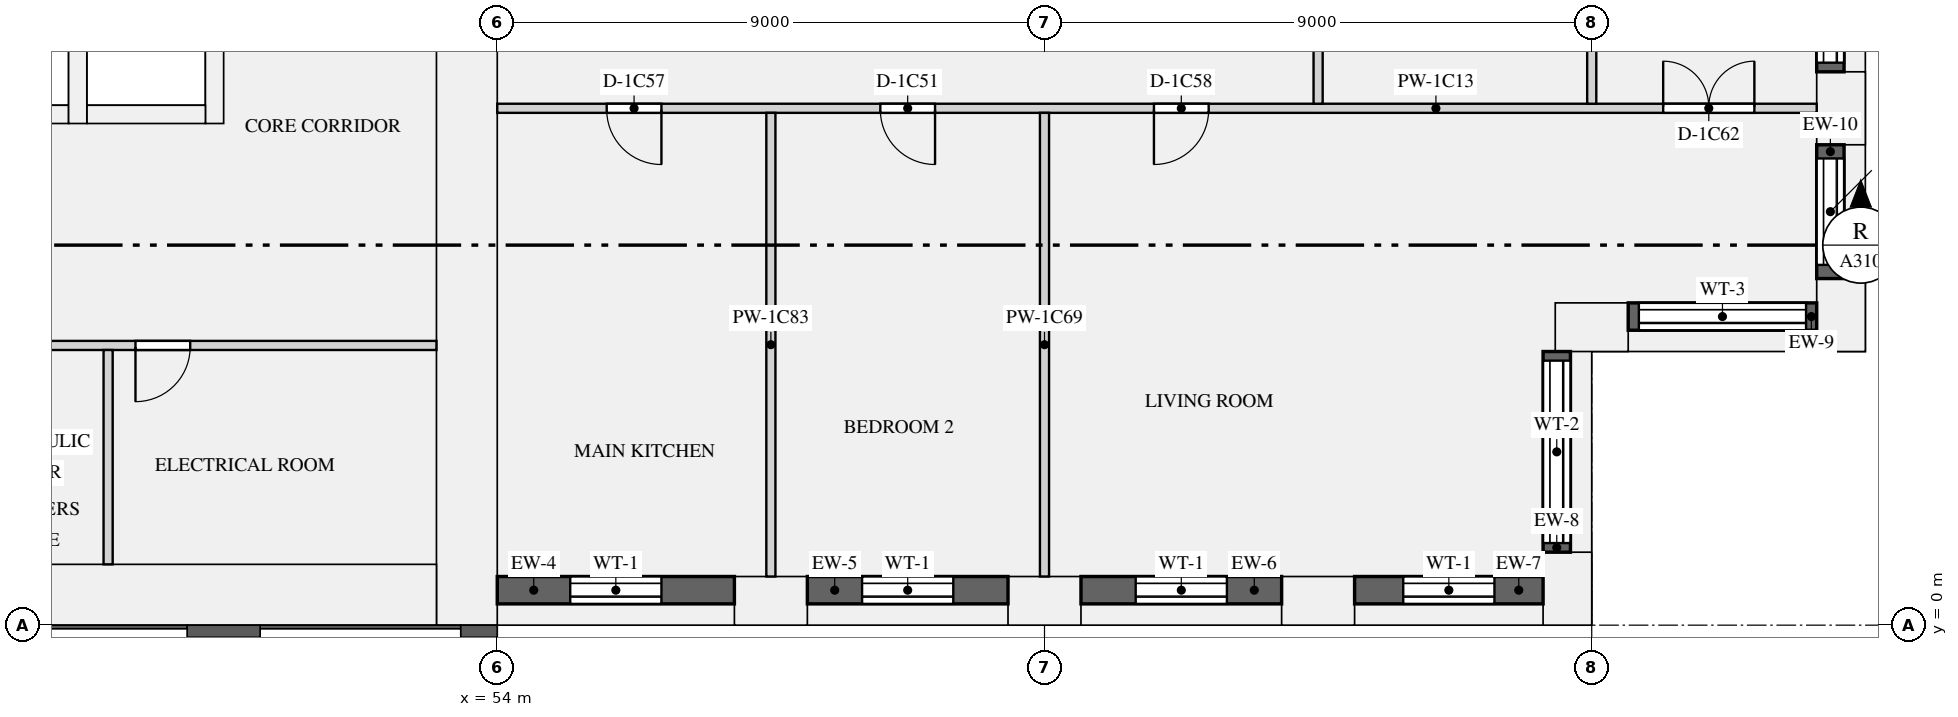
"""IFC4 building model, lengths in metres.
Left out: names, types, materials, properties, quantities, classifications, styles, units other than length and angle.
Written with IfcOpenShell. Run it as: python <this file> out.ifc"""

import sys

from ifc_helpers import new_model, si_unit, direction, frame, frame_2d, origin, origin_2d, place, context, subcontext, project, spatial, rectangle, extrude, element, fill, save


model = new_model("IFC4")
c1 = context("Model", 3, precision=1e-05, world=origin(), true_north=direction((0.0, 1.0)))
c2 = subcontext(c1, "Body", "Model", "MODEL_VIEW")
j1 = project(units=[si_unit("LENGTHUNIT", "METRE"), si_unit("PLANEANGLEUNIT", "RADIAN")], contexts=[c1])
p1 = place(None, origin())
s1 = spatial("IfcSite", under=j1, at=p1, CompositionType="ELEMENT")
p2 = place(p1, origin())
s2 = spatial("IfcBuilding", under=s1, at=p2, CompositionType="ELEMENT")
p3 = place(p2, frame((0.0, 0.0, 38.4)))
s3 = spatial("IfcBuildingStorey", under=s2, at=p3, CompositionType="ELEMENT", Elevation=38.4)
for number, where, z_axis, x_axis in (
    (1, (58.5, 0.4, 0.0), (0.0, 0.0, 1.0), (1.0, 0.0, 0.0)),
    (2, (63.0, 0.4, 0.0), (0.0, 0.0, 1.0), (1.0, 0.0, 0.0)),
    (3, (67.5, 0.4, 0.0), (0.0, 0.0, 1.0), (1.0, 0.0, 0.0)),
    (4, (71.6, 0.6, 0.0), (0.0, 0.0, 1.0), (0.0, 1.0, 0.0)),
    (5, (72.0, 4.9, 0.0), (0.0, 0.0, 1.0), (1.0, 0.0, 0.0)),
    (6, (76.1, 5.1, 0.0), (0.0, 0.0, 1.0), (0.0, 1.0, 0.0)),
    (7, (76.1, 8.5, 0.0), (0.0, 0.0, 1.0), (0.0, 1.0, 0.0)),
):
    element("IfcColumn", number, at=place(p3, frame(where, z_axis=z_axis, x_axis=x_axis)), inside=s3, PredefinedType="USERDEFINED", context=c2, shape_type="SweptSolid", body=[
        extrude(rectangle(XDim=1.2, YDim=0.8, at=origin_2d()), origin(), (0.0, 0.0, 1.0), 3.15),
    ])
p4 = place(p3, frame((53.5, 0.0, 0.0), z_axis=(0.0, 0.0, 1.0), x_axis=(0.0, 1.0, 0.0)))
e8 = element("IfcWall", 8, at=p4, inside=s3, PredefinedType="SHEAR", context=c2, shape_type="SweptSolid", body=[
    extrude(rectangle(XDim=12.5, YDim=1.0, at=frame_2d((6.25, 0.0))), origin(), (0.0, 0.0, 1.0), 3.15),
])
p5 = place(p3, frame((19.0, 0.5, 0.0), z_axis=(0.0, 0.0, 1.0), x_axis=(1.0, 0.0, 0.0)))
e9 = element("IfcWall", 9, at=p5, inside=s3, PredefinedType="SHEAR", context=c2, shape_type="SweptSolid", body=[
    extrude(rectangle(XDim=34.0, YDim=1.0, at=frame_2d((17.0, 0.0))), origin(), (0.0, 0.0, 1.0), 3.15),
])
for number, where, z_axis, x_axis in (
    (10, (45.0, 8.4, 0.0), (0.0, 0.0, 1.0), (1.0, 0.0, 0.0)),
    (11, (47.25, 8.4, 0.0), (0.0, 0.0, 1.0), (1.0, 0.0, 0.0)),
):
    element("IfcWall", number, at=place(p3, frame(where, z_axis=z_axis, x_axis=x_axis)), inside=s3, PredefinedType="SHEAR", context=c2, shape_type="SweptSolid", body=[
        extrude(rectangle(XDim=1.95, YDim=0.3, at=frame_2d((0.975, 0.0))), origin(), (0.0, 0.0, 1.0), 3.15),
    ])
for number, where, z_axis, x_axis in (
    (12, (47.1, 8.25, 0.0), (0.0, 0.0, 1.0), (0.0, 1.0, 0.0)),
    (13, (49.35, 8.25, 0.0), (0.0, 0.0, 1.0), (0.0, 1.0, 0.0)),
):
    element("IfcWall", number, at=place(p3, frame(where, z_axis=z_axis, x_axis=x_axis)), inside=s3, PredefinedType="SHEAR", context=c2, shape_type="SweptSolid", body=[
        extrude(rectangle(XDim=3.65, YDim=0.3, at=frame_2d((1.825, 0.0))), origin(), (0.0, 0.0, 1.0), 3.15),
    ])
p6 = place(p3, frame((54.0, 0.575, 0.9), z_axis=(0.0, 0.0, 1.0), x_axis=(1.0, 0.0, 0.0)))
e14 = element("IfcWall", 14, at=p6, inside=s3, PredefinedType="SOLIDWALL", context=c2, shape_type="SweptSolid", body=[
    extrude(rectangle(XDim=3.9, YDim=0.45, at=frame_2d((1.95, 0.0))), origin(), (0.0, 0.0, 1.0), 1.93),
])
p7 = place(p6, frame((1.2, 0.0, 0.15)))
e15 = element("IfcOpeningElement", 15, at=p7, cuts=e14, PredefinedType="OPENING", context=c2, shape_type="SweptSolid", body=[
    extrude(rectangle(XDim=1.5, YDim=1.5, at=frame_2d((0.75, 0.75))), frame((0.0, 0.235, 0.0), z_axis=(0.0, -1.0, 0.0), x_axis=(1.0, 0.0, 0.0)), (0.0, 0.0, 1.0), 0.47),
])
p8 = place(p3, frame((59.1, 0.575, 0.9), z_axis=(0.0, 0.0, 1.0), x_axis=(1.0, 0.0, 0.0)))
e16 = element("IfcWall", 16, at=p8, inside=s3, PredefinedType="SOLIDWALL", context=c2, shape_type="SweptSolid", body=[
    extrude(rectangle(XDim=3.3, YDim=0.45, at=frame_2d((1.65, 0.0))), origin(), (0.0, 0.0, 1.0), 1.93),
])
p9 = place(p8, frame((0.9, 0.0, 0.15)))
e17 = element("IfcOpeningElement", 17, at=p9, cuts=e16, PredefinedType="OPENING", context=c2, shape_type="SweptSolid", body=[
    extrude(rectangle(XDim=1.5, YDim=1.5, at=frame_2d((0.75, 0.75))), frame((0.0, 0.235, 0.0), z_axis=(0.0, -1.0, 0.0), x_axis=(1.0, 0.0, 0.0)), (0.0, 0.0, 1.0), 0.47),
])
p10 = place(p3, frame((63.6, 0.575, 0.9), z_axis=(0.0, 0.0, 1.0), x_axis=(1.0, 0.0, 0.0)))
e18 = element("IfcWall", 18, at=p10, inside=s3, PredefinedType="SOLIDWALL", context=c2, shape_type="SweptSolid", body=[
    extrude(rectangle(XDim=3.3, YDim=0.45, at=frame_2d((1.65, 0.0))), origin(), (0.0, 0.0, 1.0), 1.93),
])
p11 = place(p10, frame((0.9, 0.0, 0.15)))
e19 = element("IfcOpeningElement", 19, at=p11, cuts=e18, PredefinedType="OPENING", context=c2, shape_type="SweptSolid", body=[
    extrude(rectangle(XDim=1.5, YDim=1.5, at=frame_2d((0.75, 0.75))), frame((0.0, 0.235, 0.0), z_axis=(0.0, -1.0, 0.0), x_axis=(1.0, 0.0, 0.0)), (0.0, 0.0, 1.0), 0.47),
])
p12 = place(p3, frame((68.1, 0.575, 0.9), z_axis=(0.0, 0.0, 1.0), x_axis=(1.0, 0.0, 0.0)))
e20 = element("IfcWall", 20, at=p12, inside=s3, PredefinedType="SOLIDWALL", context=c2, shape_type="SweptSolid", body=[
    extrude(rectangle(XDim=3.1, YDim=0.45, at=frame_2d((1.55, 0.0))), origin(), (0.0, 0.0, 1.0), 1.93),
])
p13 = place(p12, frame((0.8, 0.0, 0.15)))
e21 = element("IfcOpeningElement", 21, at=p13, cuts=e20, PredefinedType="OPENING", context=c2, shape_type="SweptSolid", body=[
    extrude(rectangle(XDim=1.5, YDim=1.5, at=frame_2d((0.75, 0.75))), frame((0.0, 0.235, 0.0), z_axis=(0.0, -1.0, 0.0), x_axis=(1.0, 0.0, 0.0)), (0.0, 0.0, 1.0), 0.47),
])
p14 = place(p3, frame((71.425, 1.2, 0.9), z_axis=(0.0, 0.0, 1.0), x_axis=(0.0, 1.0, 0.0)))
e22 = element("IfcWall", 22, at=p14, inside=s3, PredefinedType="SOLIDWALL", context=c2, shape_type="SweptSolid", body=[
    extrude(rectangle(XDim=3.3, YDim=0.45, at=frame_2d((1.65, 0.0))), origin(), (0.0, 0.0, 1.0), 1.93),
])
p15 = place(p14, frame((0.15, 0.0, 0.15)))
e23 = element("IfcOpeningElement", 23, at=p15, cuts=e22, PredefinedType="OPENING", context=c2, shape_type="SweptSolid", body=[
    extrude(rectangle(XDim=3.0, YDim=1.5, at=frame_2d((1.5, 0.75))), frame((0.0, 0.235, 0.0), z_axis=(0.0, -1.0, 0.0), x_axis=(1.0, 0.0, 0.0)), (0.0, 0.0, 1.0), 0.47),
])
p16 = place(p3, frame((72.6, 5.075, 0.9), z_axis=(0.0, 0.0, 1.0), x_axis=(1.0, 0.0, 0.0)))
e24 = element("IfcWall", 24, at=p16, inside=s3, PredefinedType="SOLIDWALL", context=c2, shape_type="SweptSolid", body=[
    extrude(rectangle(XDim=3.1, YDim=0.45, at=frame_2d((1.55, 0.0))), origin(), (0.0, 0.0, 1.0), 1.93),
])
p17 = place(p16, frame((0.175, 0.0, 0.15)))
e25 = element("IfcOpeningElement", 25, at=p17, cuts=e24, PredefinedType="OPENING", context=c2, shape_type="SweptSolid", body=[
    extrude(rectangle(XDim=2.75, YDim=1.5, at=frame_2d((1.375, 0.75))), frame((0.0, 0.235, 0.0), z_axis=(0.0, -1.0, 0.0), x_axis=(1.0, 0.0, 0.0)), (0.0, 0.0, 1.0), 0.47),
])
p18 = place(p3, frame((75.925, 5.7, 0.9), z_axis=(0.0, 0.0, 1.0), x_axis=(0.0, 1.0, 0.0)))
e26 = element("IfcWall", 26, at=p18, inside=s3, PredefinedType="SOLIDWALL", context=c2, shape_type="SweptSolid", body=[
    extrude(rectangle(XDim=2.2, YDim=0.45, at=frame_2d((1.1, 0.0))), origin(), (0.0, 0.0, 1.0), 1.93),
])
p19 = place(p18, frame((0.225, 0.0, 0.15)))
e27 = element("IfcOpeningElement", 27, at=p19, cuts=e26, PredefinedType="OPENING", context=c2, shape_type="SweptSolid", body=[
    extrude(rectangle(XDim=1.75, YDim=1.5, at=frame_2d((0.875, 0.75))), frame((0.0, 0.235, 0.0), z_axis=(0.0, -1.0, 0.0), x_axis=(1.0, 0.0, 0.0)), (0.0, 0.0, 1.0), 0.47),
])
p20 = place(p3, frame((75.925, 9.1, 0.9), z_axis=(0.0, 0.0, 1.0), x_axis=(0.0, 1.0, 0.0)))
e28 = element("IfcWall", 28, at=p20, inside=s3, PredefinedType="SOLIDWALL", context=c2, shape_type="SweptSolid", body=[
    extrude(rectangle(XDim=2.8, YDim=0.45, at=frame_2d((1.4, 0.0))), origin(), (0.0, 0.0, 1.0), 1.93),
])
p21 = place(p20, frame((0.15, 0.0, 0.15)))
e29 = element("IfcOpeningElement", 29, at=p21, cuts=e28, PredefinedType="OPENING", context=c2, shape_type="SweptSolid", body=[
    extrude(rectangle(XDim=2.5, YDim=1.5, at=frame_2d((1.25, 0.75))), frame((0.0, 0.235, 0.0), z_axis=(0.0, -1.0, 0.0), x_axis=(1.0, 0.0, 0.0)), (0.0, 0.0, 1.0), 0.47),
])
p22 = place(p3, frame((44.7, 4.6, 0.0), z_axis=(0.0, 0.0, 1.0), x_axis=(1.0, 0.0, 0.0)))
e30 = element("IfcWall", 30, at=p22, inside=s3, PredefinedType="PARTITIONING", context=c2, shape_type="SweptSolid", body=[
    extrude(rectangle(XDim=8.3, YDim=0.15, at=frame_2d((4.15, 0.0))), origin(), (0.0, 0.0, 1.0), 2.83),
])
p23 = place(p22, frame((0.35, 0.0, 0.0)))
e31 = element("IfcOpeningElement", 31, at=p23, cuts=e30, PredefinedType="OPENING", context=c2, shape_type="SweptSolid", body=[
    extrude(rectangle(XDim=0.9, YDim=2.1, at=frame_2d((0.45, 1.05))), frame((0.0, 0.085, 0.0), z_axis=(0.0, -1.0, 0.0), x_axis=(1.0, 0.0, 0.0)), (0.0, 0.0, 1.0), 0.17),
])
p24 = place(p22, frame((3.35, 0.0, 0.0)))
e32 = element("IfcOpeningElement", 32, at=p24, cuts=e30, PredefinedType="OPENING", context=c2, shape_type="SweptSolid", body=[
    extrude(rectangle(XDim=0.9, YDim=2.1, at=frame_2d((0.45, 1.05))), frame((0.0, 0.085, 0.0), z_axis=(0.0, -1.0, 0.0), x_axis=(1.0, 0.0, 0.0)), (0.0, 0.0, 1.0), 0.17),
])
p25 = place(p3, frame((47.6, 1.0, 0.0), z_axis=(0.0, 0.0, 1.0), x_axis=(0.0, 1.0, 0.0)))
e33 = element("IfcWall", 33, at=p25, inside=s3, PredefinedType="PARTITIONING", context=c2, shape_type="SweptSolid", body=[
    extrude(rectangle(XDim=3.525, YDim=0.15, at=frame_2d((1.762, 0.0))), origin(), (0.0, 0.0, 1.0), 2.83),
])
p26 = place(p3, frame((54.0, 8.5, 0.0), z_axis=(0.0, 0.0, 1.0), x_axis=(1.0, 0.0, 0.0)))
e34 = element("IfcWall", 34, at=p26, inside=s3, PredefinedType="PARTITIONING", context=c2, shape_type="SweptSolid", body=[
    extrude(rectangle(XDim=21.7, YDim=0.15, at=frame_2d((10.85, 0.0))), origin(), (0.0, 0.0, 1.0), 2.83),
])
p27 = place(p26, frame((6.3, 0.0, 0.0)))
e35 = element("IfcOpeningElement", 35, at=p27, cuts=e34, PredefinedType="OPENING", context=c2, shape_type="SweptSolid", body=[
    extrude(rectangle(XDim=0.9, YDim=2.1, at=frame_2d((0.45, 1.05))), frame((0.0, 0.085, 0.0), z_axis=(0.0, -1.0, 0.0), x_axis=(1.0, 0.0, 0.0)), (0.0, 0.0, 1.0), 0.17),
])
p28 = place(p26, frame((1.8, 0.0, 0.0)))
e36 = element("IfcOpeningElement", 36, at=p28, cuts=e34, PredefinedType="OPENING", context=c2, shape_type="SweptSolid", body=[
    extrude(rectangle(XDim=0.9, YDim=2.1, at=frame_2d((0.45, 1.05))), frame((0.0, 0.085, 0.0), z_axis=(0.0, -1.0, 0.0), x_axis=(1.0, 0.0, 0.0)), (0.0, 0.0, 1.0), 0.17),
])
p29 = place(p26, frame((10.8, 0.0, 0.0)))
e37 = element("IfcOpeningElement", 37, at=p29, cuts=e34, PredefinedType="OPENING", context=c2, shape_type="SweptSolid", body=[
    extrude(rectangle(XDim=0.9, YDim=2.1, at=frame_2d((0.45, 1.05))), frame((0.0, 0.085, 0.0), z_axis=(0.0, -1.0, 0.0), x_axis=(1.0, 0.0, 0.0)), (0.0, 0.0, 1.0), 0.17),
])
p30 = place(p26, frame((19.175, 0.0, 0.0)))
e38 = element("IfcOpeningElement", 38, at=p30, cuts=e34, PredefinedType="OPENING", context=c2, shape_type="SweptSolid", body=[
    extrude(rectangle(XDim=1.5, YDim=2.1, at=frame_2d((0.75, 1.05))), frame((0.0, 0.085, 0.0), z_axis=(0.0, -1.0, 0.0), x_axis=(1.0, 0.0, 0.0)), (0.0, 0.0, 1.0), 0.17),
])
p31 = place(p3, frame((63.0, 0.8, 0.0), z_axis=(0.0, 0.0, 1.0), x_axis=(0.0, 1.0, 0.0)))
e39 = element("IfcWall", 39, at=p31, inside=s3, PredefinedType="PARTITIONING", context=c2, shape_type="SweptSolid", body=[
    extrude(rectangle(XDim=7.625, YDim=0.15, at=frame_2d((3.812, 0.0))), origin(), (0.0, 0.0, 1.0), 2.83),
])
p32 = place(p3, frame((72.0, 8.575, 0.0), z_axis=(0.0, 0.0, 1.0), x_axis=(0.0, 1.0, 0.0)))
e40 = element("IfcWall", 40, at=p32, inside=s3, PredefinedType="PARTITIONING", context=c2, shape_type="SweptSolid", body=[
    extrude(rectangle(XDim=3.85, YDim=0.15, at=frame_2d((1.925, 0.0))), origin(), (0.0, 0.0, 1.0), 2.83),
])
p33 = place(p3, frame((67.5, 8.575, 0.0), z_axis=(0.0, 0.0, 1.0), x_axis=(0.0, 1.0, 0.0)))
e41 = element("IfcWall", 41, at=p33, inside=s3, PredefinedType="PARTITIONING", context=c2, shape_type="SweptSolid", body=[
    extrude(rectangle(XDim=15.35, YDim=0.15, at=frame_2d((7.675, 0.0))), origin(), (0.0, 0.0, 1.0), 2.83),
])
p34 = place(p33, frame((7.475, 0.0, 0.0)))
e42 = element("IfcOpeningElement", 42, at=p34, cuts=e41, PredefinedType="OPENING", context=c2, shape_type="SweptSolid", body=[
    extrude(rectangle(XDim=0.9, YDim=2.1, at=frame_2d((0.45, 1.05))), frame((0.0, 0.085, 0.0), z_axis=(0.0, -1.0, 0.0), x_axis=(1.0, 0.0, 0.0)), (0.0, 0.0, 1.0), 0.17),
])
p35 = place(p33, frame((1.475, 0.0, 0.0)))
e43 = element("IfcOpeningElement", 43, at=p35, cuts=e41, PredefinedType="OPENING", context=c2, shape_type="SweptSolid", body=[
    extrude(rectangle(XDim=0.9, YDim=2.1, at=frame_2d((0.45, 1.05))), frame((0.0, 0.085, 0.0), z_axis=(0.0, -1.0, 0.0), x_axis=(1.0, 0.0, 0.0)), (0.0, 0.0, 1.0), 0.17),
])
p36 = place(p3, frame((58.5, 0.8, 0.0), z_axis=(0.0, 0.0, 1.0), x_axis=(0.0, 1.0, 0.0)))
e44 = element("IfcWall", 44, at=p36, inside=s3, PredefinedType="PARTITIONING", context=c2, shape_type="SweptSolid", body=[
    extrude(rectangle(XDim=7.625, YDim=0.15, at=frame_2d((3.812, 0.0))), origin(), (0.0, 0.0, 1.0), 2.83),
])
p37 = place(p7, origin())
e45 = element("IfcWindow", 45, at=p37, inside=s3, PartitioningType="SINGLE_PANEL", PredefinedType="WINDOW", context=c2, shape_type="SweptSolid", body=[
    extrude(rectangle(XDim=1.5, YDim=1.5, at=frame_2d((0.75, 0.75))), frame((0.0, -0.065, 0.0), z_axis=(0.0, -1.0, 0.0), x_axis=(1.0, 0.0, 0.0)), (0.0, 0.0, 1.0), 0.06),
])
fill(e15, e45)
p38 = place(p9, origin())
e46 = element("IfcWindow", 46, at=p38, inside=s3, PartitioningType="SINGLE_PANEL", PredefinedType="WINDOW", context=c2, shape_type="SweptSolid", body=[
    extrude(rectangle(XDim=1.5, YDim=1.5, at=frame_2d((0.75, 0.75))), frame((0.0, -0.065, 0.0), z_axis=(0.0, -1.0, 0.0), x_axis=(1.0, 0.0, 0.0)), (0.0, 0.0, 1.0), 0.06),
])
fill(e17, e46)
p39 = place(p11, origin())
e47 = element("IfcWindow", 47, at=p39, inside=s3, PartitioningType="SINGLE_PANEL", PredefinedType="WINDOW", context=c2, shape_type="SweptSolid", body=[
    extrude(rectangle(XDim=1.5, YDim=1.5, at=frame_2d((0.75, 0.75))), frame((0.0, -0.065, 0.0), z_axis=(0.0, -1.0, 0.0), x_axis=(1.0, 0.0, 0.0)), (0.0, 0.0, 1.0), 0.06),
])
fill(e19, e47)
p40 = place(p13, origin())
e48 = element("IfcWindow", 48, at=p40, inside=s3, PartitioningType="SINGLE_PANEL", PredefinedType="WINDOW", context=c2, shape_type="SweptSolid", body=[
    extrude(rectangle(XDim=1.5, YDim=1.5, at=frame_2d((0.75, 0.75))), frame((0.0, -0.065, 0.0), z_axis=(0.0, -1.0, 0.0), x_axis=(1.0, 0.0, 0.0)), (0.0, 0.0, 1.0), 0.06),
])
fill(e21, e48)
p41 = place(p15, origin())
e49 = element("IfcWindow", 49, at=p41, inside=s3, PartitioningType="SINGLE_PANEL", PredefinedType="WINDOW", context=c2, shape_type="SweptSolid", body=[
    extrude(rectangle(XDim=3.0, YDim=1.5, at=frame_2d((1.5, 0.75))), frame((0.0, -0.065, 0.0), z_axis=(0.0, -1.0, 0.0), x_axis=(1.0, 0.0, 0.0)), (0.0, 0.0, 1.0), 0.06),
])
fill(e23, e49)
p42 = place(p17, origin())
e50 = element("IfcWindow", 50, at=p42, inside=s3, PartitioningType="SINGLE_PANEL", PredefinedType="WINDOW", context=c2, shape_type="SweptSolid", body=[
    extrude(rectangle(XDim=2.75, YDim=1.5, at=frame_2d((1.375, 0.75))), frame((0.0, -0.065, 0.0), z_axis=(0.0, -1.0, 0.0), x_axis=(1.0, 0.0, 0.0)), (0.0, 0.0, 1.0), 0.06),
])
fill(e25, e50)
p43 = place(p19, origin())
e51 = element("IfcWindow", 51, at=p43, inside=s3, PartitioningType="SINGLE_PANEL", PredefinedType="WINDOW", context=c2, shape_type="SweptSolid", body=[
    extrude(rectangle(XDim=1.75, YDim=1.5, at=frame_2d((0.875, 0.75))), frame((0.0, -0.065, 0.0), z_axis=(0.0, -1.0, 0.0), x_axis=(1.0, 0.0, 0.0)), (0.0, 0.0, 1.0), 0.06),
])
fill(e27, e51)
p44 = place(p21, origin())
e52 = element("IfcWindow", 52, at=p44, inside=s3, PartitioningType="SINGLE_PANEL", PredefinedType="WINDOW", context=c2, shape_type="SweptSolid", body=[
    extrude(rectangle(XDim=2.5, YDim=1.5, at=frame_2d((1.25, 0.75))), frame((0.0, -0.065, 0.0), z_axis=(0.0, -1.0, 0.0), x_axis=(1.0, 0.0, 0.0)), (0.0, 0.0, 1.0), 0.06),
])
fill(e29, e52)
p45 = place(p24, frame((0.9, 0.0, 0.0), z_axis=(0.0, 0.0, 1.0), x_axis=(-1.0, 0.0, 0.0)))
e53 = element("IfcDoor", 53, at=p45, inside=s3, OperationType="SINGLE_SWING_RIGHT", PredefinedType="DOOR", context=c2, shape_type="SweptSolid", body=[
    extrude(rectangle(XDim=0.9, YDim=2.1, at=frame_2d((0.45, 1.05))), frame((0.0, 0.025, 0.0), z_axis=(0.0, -1.0, 0.0), x_axis=(1.0, 0.0, 0.0)), (0.0, 0.0, 1.0), 0.05),
])
fill(e32, e53)
p46 = place(p27, frame((0.9, 0.0, 0.0), z_axis=(0.0, 0.0, 1.0), x_axis=(-1.0, 0.0, 0.0)))
e54 = element("IfcDoor", 54, at=p46, inside=s3, OperationType="SINGLE_SWING_LEFT", PredefinedType="DOOR", context=c2, shape_type="SweptSolid", body=[
    extrude(rectangle(XDim=0.9, YDim=2.1, at=frame_2d((0.45, 1.05))), frame((0.0, 0.025, 0.0), z_axis=(0.0, -1.0, 0.0), x_axis=(1.0, 0.0, 0.0)), (0.0, 0.0, 1.0), 0.05),
])
fill(e35, e54)
p47 = place(p28, frame((0.9, 0.0, 0.0), z_axis=(0.0, 0.0, 1.0), x_axis=(-1.0, 0.0, 0.0)))
e55 = element("IfcDoor", 55, at=p47, inside=s3, OperationType="SINGLE_SWING_LEFT", PredefinedType="DOOR", context=c2, shape_type="SweptSolid", body=[
    extrude(rectangle(XDim=0.9, YDim=2.1, at=frame_2d((0.45, 1.05))), frame((0.0, 0.025, 0.0), z_axis=(0.0, -1.0, 0.0), x_axis=(1.0, 0.0, 0.0)), (0.0, 0.0, 1.0), 0.05),
])
fill(e36, e55)
p48 = place(p29, frame((0.9, 0.0, 0.0), z_axis=(0.0, 0.0, 1.0), x_axis=(-1.0, 0.0, 0.0)))
e56 = element("IfcDoor", 56, at=p48, inside=s3, OperationType="SINGLE_SWING_RIGHT", PredefinedType="DOOR", context=c2, shape_type="SweptSolid", body=[
    extrude(rectangle(XDim=0.9, YDim=2.1, at=frame_2d((0.45, 1.05))), frame((0.0, 0.025, 0.0), z_axis=(0.0, -1.0, 0.0), x_axis=(1.0, 0.0, 0.0)), (0.0, 0.0, 1.0), 0.05),
])
fill(e37, e56)
p49 = place(p30, origin())
e57 = element("IfcDoor", 57, at=p49, inside=s3, OperationType="DOUBLE_DOOR_SINGLE_SWING", PredefinedType="DOOR", context=c2, shape_type="SweptSolid", body=[
    extrude(rectangle(XDim=1.5, YDim=2.1, at=frame_2d((0.75, 1.05))), frame((0.0, 0.025, 0.0), z_axis=(0.0, -1.0, 0.0), x_axis=(1.0, 0.0, 0.0)), (0.0, 0.0, 1.0), 0.05),
])
fill(e38, e57)
save(model, sys.argv[1])
